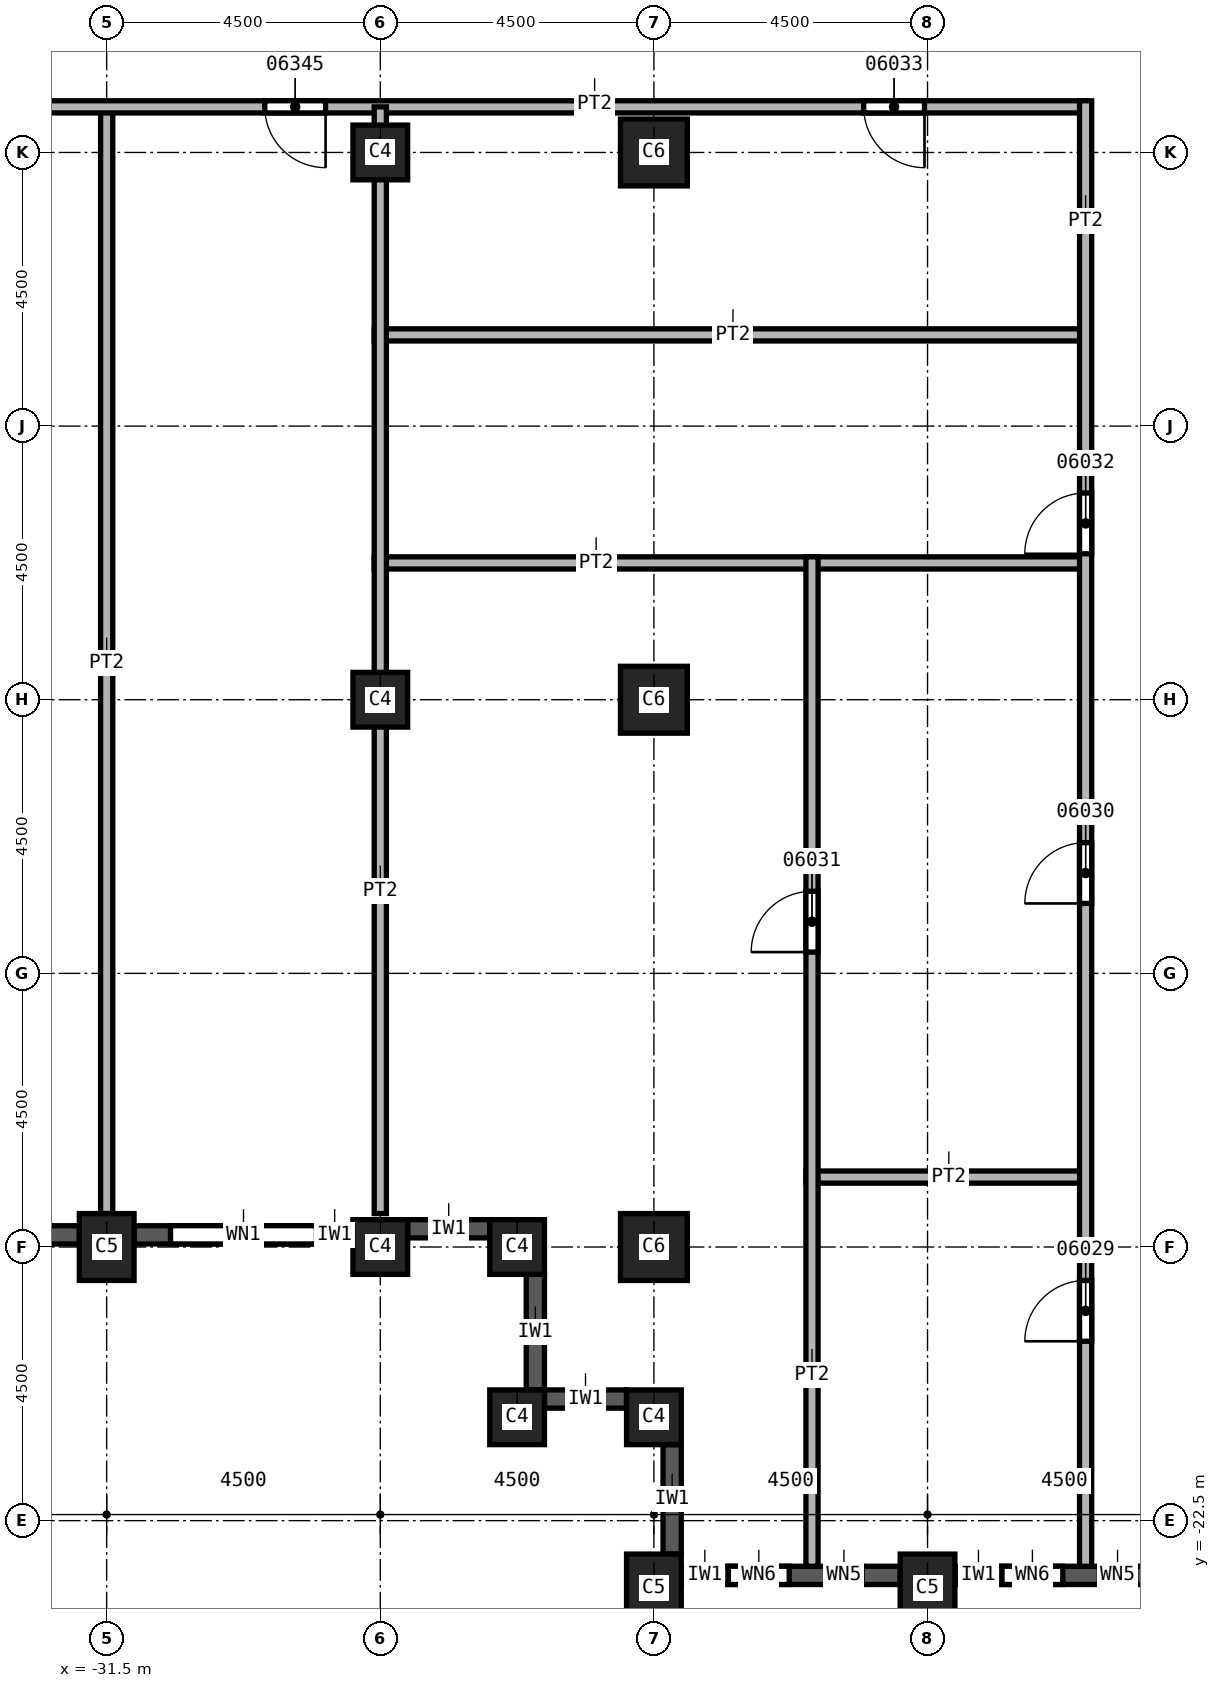
"""IFC4 building model, lengths in metres.
Left out: names, types, materials, properties, quantities, classifications, styles, units other than length and angle.
Written with IfcOpenShell. Run it as: python <this file> out.ifc"""

import sys

from ifc_helpers import new_model, si_unit, direction, frame, frame_2d, origin, origin_2d, place, context, subcontext, project, spatial, rectangle, extrude, element, fill, save


model = new_model("IFC4")
c1 = context("Model", 3, precision=1e-05, world=origin(), true_north=direction((0.0, 1.0)))
c2 = subcontext(c1, "Body", "Model", "MODEL_VIEW")
j1 = project(units=[si_unit("LENGTHUNIT", "METRE"), si_unit("PLANEANGLEUNIT", "RADIAN")], contexts=[c1])
p1 = place(None, origin())
s1 = spatial("IfcSite", under=j1, at=p1, CompositionType="ELEMENT")
p2 = place(p1, origin())
s2 = spatial("IfcBuilding", under=s1, at=p2, CompositionType="ELEMENT")
p3 = place(p2, frame((0.0, 0.0, 130.0)))
s3 = spatial("IfcBuildingStorey", under=s2, at=p3, CompositionType="ELEMENT", Elevation=130.0)
p4 = place(p3, frame((-31.5, -18.0, 0.0), z_axis=(0.0, 0.0, 1.0), x_axis=(1.0, 0.0, 0.0)))
e1 = element("IfcColumn", 1, at=p4, inside=s3, PredefinedType="COLUMN", context=c2, shape_type="SweptSolid", body=[
    extrude(rectangle(XDim=0.9, YDim=1.1, at=origin_2d()), origin(), (0.0, 0.0, 1.0), 3.7),
])
for number, where, z_axis, x_axis in (
    (2, (-22.5, 0.0, 0.0), (0.0, 0.0, 1.0), (1.0, 0.0, 0.0)),
    (3, (-22.5, -9.0, 0.0), (0.0, 0.0, 1.0), (1.0, 0.0, 0.0)),
    (4, (-22.5, -18.0, 0.0), (0.0, 0.0, 1.0), (1.0, 0.0, 0.0)),
):
    element("IfcColumn", number, at=place(p3, frame(where, z_axis=z_axis, x_axis=x_axis)), inside=s3, PredefinedType="COLUMN", context=c2, shape_type="SweptSolid", body=[
        extrude(rectangle(XDim=1.1, YDim=1.1, at=origin_2d()), origin(), (0.0, 0.0, 1.0), 3.7),
    ])
for number, where, z_axis, x_axis in (
    (5, (-18.0, -23.6, 0.0), (0.0, 0.0, 1.0), (1.0, 0.0, 0.0)),
    (6, (-22.5, -23.6, 0.0), (0.0, 0.0, 1.0), (1.0, 0.0, 0.0)),
):
    element("IfcColumn", number, at=place(p3, frame(where, z_axis=z_axis, x_axis=x_axis)), inside=s3, PredefinedType="COLUMN", context=c2, shape_type="SweptSolid", body=[
        extrude(rectangle(XDim=0.9, YDim=1.1, at=origin_2d()), origin(), (0.0, 0.0, 1.0), 3.7),
    ])
for number, where, z_axis, x_axis in (
    (7, (-27.0, 0.0, 0.0), (0.0, 0.0, 1.0), (1.0, 0.0, 0.0)),
    (8, (-27.0, -9.0, 0.0), (0.0, 0.0, 1.0), (1.0, 0.0, 0.0)),
    (9, (-27.0, -18.0, 0.0), (0.0, 0.0, 1.0), (1.0, 0.0, 0.0)),
    (10, (-22.5, -20.8, 0.0), (0.0, 0.0, 1.0), (1.0, 0.0, 0.0)),
    (11, (-24.75, -20.8, 0.0), (0.0, 0.0, 1.0), (1.0, 0.0, 0.0)),
    (12, (-24.75, -18.0, 0.0), (0.0, 0.0, 1.0), (1.0, 0.0, 0.0)),
):
    element("IfcColumn", number, at=place(p3, frame(where, z_axis=z_axis, x_axis=x_axis)), inside=s3, PredefinedType="COLUMN", context=c2, shape_type="SweptSolid", body=[
        extrude(rectangle(XDim=0.9, YDim=0.9, at=origin_2d()), origin(), (0.0, 0.0, 1.0), 3.7),
    ])
p5 = place(p3, frame((-35.55, -17.8, 0.0), z_axis=(0.0, 0.0, 1.0), x_axis=(1.0, 0.0, 0.0)))
e13 = element("IfcWall", 13, at=p5, inside=s3, PredefinedType="SOLIDWALL", context=c2, shape_type="SweptSolid", body=[
    extrude(rectangle(XDim=3.6, YDim=0.3, at=frame_2d((1.8, 0.0))), origin(), (0.0, 0.0, 1.0), 3.1),
])
p6 = place(p5, frame((0.6, 0.0, 0.8)))
e14 = element("IfcOpeningElement", 14, at=p6, cuts=e13, PredefinedType="OPENING", context=c2, shape_type="SweptSolid", body=[
    extrude(rectangle(XDim=2.4, YDim=1.95, at=frame_2d((1.2, 0.975))), frame((0.0, 0.15, 0.0), z_axis=(0.0, -1.0, 0.0), x_axis=(1.0, 0.0, 0.0)), (0.0, 0.0, 1.0), 0.3),
])
p7 = place(p3, frame((-31.05, -17.8, 0.0), z_axis=(0.0, 0.0, 1.0), x_axis=(1.0, 0.0, 0.0)))
e15 = element("IfcWall", 15, at=p7, inside=s3, PredefinedType="SOLIDWALL", context=c2, shape_type="SweptSolid", body=[
    extrude(rectangle(XDim=3.6, YDim=0.3, at=frame_2d((1.8, 0.0))), origin(), (0.0, 0.0, 1.0), 3.1),
])
p8 = place(p7, frame((0.6, 0.0, 0.8)))
e16 = element("IfcOpeningElement", 16, at=p8, cuts=e15, PredefinedType="OPENING", context=c2, shape_type="SweptSolid", body=[
    extrude(rectangle(XDim=2.4, YDim=1.95, at=frame_2d((1.2, 0.975))), frame((0.0, 0.15, 0.0), z_axis=(0.0, -1.0, 0.0), x_axis=(1.0, 0.0, 0.0)), (0.0, 0.0, 1.0), 0.3),
])
p9 = place(p3, frame((-26.55, -17.7, 0.0), z_axis=(0.0, 0.0, 1.0), x_axis=(1.0, 0.0, 0.0)))
e17 = element("IfcWall", 17, at=p9, inside=s3, PredefinedType="SOLIDWALL", context=c2, shape_type="SweptSolid", body=[
    extrude(rectangle(XDim=1.35, YDim=0.3, at=frame_2d((0.675, 0.0))), origin(), (0.0, 0.0, 1.0), 3.1),
])
p10 = place(p3, frame((-24.45, -18.45, 0.0), z_axis=(0.0, 0.0, 1.0), x_axis=(0.0, -1.0, 0.0)))
e18 = element("IfcWall", 18, at=p10, inside=s3, PredefinedType="SOLIDWALL", context=c2, shape_type="SweptSolid", body=[
    extrude(rectangle(XDim=1.9, YDim=0.3, at=frame_2d((0.95, 0.0))), origin(), (0.0, 0.0, 1.0), 3.1),
])
p11 = place(p3, frame((-24.3, -20.5, 0.0), z_axis=(0.0, 0.0, 1.0), x_axis=(1.0, 0.0, 0.0)))
e19 = element("IfcWall", 19, at=p11, inside=s3, PredefinedType="SOLIDWALL", context=c2, shape_type="SweptSolid", body=[
    extrude(rectangle(XDim=1.35, YDim=0.3, at=frame_2d((0.675, 0.0))), origin(), (0.0, 0.0, 1.0), 3.1),
])
p12 = place(p3, frame((-22.2, -21.25, 0.0), z_axis=(0.0, 0.0, 1.0), x_axis=(0.0, -1.0, 0.0)))
e20 = element("IfcWall", 20, at=p12, inside=s3, PredefinedType="SOLIDWALL", context=c2, shape_type="SweptSolid", body=[
    extrude(rectangle(XDim=1.8, YDim=0.3, at=frame_2d((0.9, 0.0))), origin(), (0.0, 0.0, 1.0), 3.1),
])
p13 = place(p3, frame((-22.05, -23.4, 0.0), z_axis=(0.0, 0.0, 1.0), x_axis=(1.0, 0.0, 0.0)))
e21 = element("IfcWall", 21, at=p13, inside=s3, PredefinedType="SOLIDWALL", context=c2, shape_type="SweptSolid", body=[
    extrude(rectangle(XDim=3.6, YDim=0.3, at=frame_2d((1.8, 0.0))), origin(), (0.0, 0.0, 1.0), 3.1),
])
p14 = place(p13, frame((0.775, 0.0, 0.8)))
e22 = element("IfcOpeningElement", 22, at=p14, cuts=e21, PredefinedType="OPENING", context=c2, shape_type="SweptSolid", body=[
    extrude(rectangle(XDim=1.0, YDim=1.95, at=frame_2d((0.5, 0.975))), frame((0.0, 0.15, 0.0), z_axis=(0.0, -1.0, 0.0), x_axis=(1.0, 0.0, 0.0)), (0.0, 0.0, 1.0), 0.3),
])
p15 = place(p13, frame((2.375, 0.0, 0.8)))
e23 = element("IfcOpeningElement", 23, at=p15, cuts=e21, PredefinedType="OPENING", context=c2, shape_type="SweptSolid", body=[
    extrude(rectangle(XDim=0.6, YDim=1.95, at=frame_2d((0.3, 0.975))), frame((0.0, 0.15, 0.0), z_axis=(0.0, -1.0, 0.0), x_axis=(1.0, 0.0, 0.0)), (0.0, 0.0, 1.0), 0.3),
])
p16 = place(p3, frame((-17.55, -23.4, 0.0), z_axis=(0.0, 0.0, 1.0), x_axis=(1.0, 0.0, 0.0)))
e24 = element("IfcWall", 24, at=p16, inside=s3, PredefinedType="SOLIDWALL", context=c2, shape_type="SweptSolid", body=[
    extrude(rectangle(XDim=3.6, YDim=0.3, at=frame_2d((1.8, 0.0))), origin(), (0.0, 0.0, 1.0), 3.1),
])
p17 = place(p16, frame((0.775, 0.0, 0.8)))
e25 = element("IfcOpeningElement", 25, at=p17, cuts=e24, PredefinedType="OPENING", context=c2, shape_type="SweptSolid", body=[
    extrude(rectangle(XDim=1.0, YDim=1.95, at=frame_2d((0.5, 0.975))), frame((0.0, 0.15, 0.0), z_axis=(0.0, -1.0, 0.0), x_axis=(1.0, 0.0, 0.0)), (0.0, 0.0, 1.0), 0.3),
])
p18 = place(p16, frame((2.375, 0.0, 0.8)))
e26 = element("IfcOpeningElement", 26, at=p18, cuts=e24, PredefinedType="OPENING", context=c2, shape_type="SweptSolid", body=[
    extrude(rectangle(XDim=0.6, YDim=1.95, at=frame_2d((0.3, 0.975))), frame((0.0, 0.15, 0.0), z_axis=(0.0, -1.0, 0.0), x_axis=(1.0, 0.0, 0.0)), (0.0, 0.0, 1.0), 0.3),
])
p19 = place(p3, frame((-31.5, 0.75, 0.0), z_axis=(0.0, 0.0, 1.0), x_axis=(0.0, -1.0, 0.0)))
e27 = element("IfcWall", 27, at=p19, inside=s3, PredefinedType="PARTITIONING", context=c2, shape_type="SweptSolid", body=[
    extrude(rectangle(XDim=18.2, YDim=0.2, at=frame_2d((9.1, 0.0))), origin(), (0.0, 0.0, 1.0), 3.7),
])
p20 = place(p3, frame((-15.4, 0.75, 0.0), z_axis=(0.0, 0.0, 1.0), x_axis=(-1.0, 0.0, 0.0)))
e28 = element("IfcWall", 28, at=p20, inside=s3, PredefinedType="PARTITIONING", context=c2, shape_type="SweptSolid", body=[
    extrude(rectangle(XDim=18.45, YDim=0.2, at=frame_2d((9.225, 0.0))), origin(), (0.0, 0.0, 1.0), 3.7),
])
p21 = place(p20, frame((2.65, 0.0, 0.0)))
e29 = element("IfcOpeningElement", 29, at=p21, cuts=e28, PredefinedType="OPENING", context=c2, shape_type="SweptSolid", body=[
    extrude(rectangle(XDim=1.0, YDim=2.1, at=frame_2d((0.5, 1.05))), frame((0.0, 0.1, 0.0), z_axis=(0.0, -1.0, 0.0), x_axis=(1.0, 0.0, 0.0)), (0.0, 0.0, 1.0), 0.2),
])
p22 = place(p20, frame((12.5, 0.0, 0.0)))
e30 = element("IfcOpeningElement", 30, at=p22, cuts=e28, PredefinedType="OPENING", context=c2, shape_type="SweptSolid", body=[
    extrude(rectangle(XDim=1.0, YDim=2.1, at=frame_2d((0.5, 1.05))), frame((0.0, 0.1, 0.0), z_axis=(0.0, -1.0, 0.0), x_axis=(1.0, 0.0, 0.0)), (0.0, 0.0, 1.0), 0.2),
])
for number, where, z_axis, x_axis in (
    (31, (-27.1, -6.75, 0.0), (0.0, 0.0, 1.0), (1.0, 0.0, 0.0)),
    (32, (-27.1, -3.0, 0.0), (0.0, 0.0, 1.0), (1.0, 0.0, 0.0)),
):
    element("IfcWall", number, at=place(p3, frame(where, z_axis=z_axis, x_axis=x_axis)), inside=s3, PredefinedType="PARTITIONING", context=c2, shape_type="SweptSolid", body=[
        extrude(rectangle(XDim=11.7, YDim=0.2, at=frame_2d((5.85, 0.0))), origin(), (0.0, 0.0, 1.0), 3.7),
    ])
p23 = place(p3, frame((-27.0, -17.45, 0.0), z_axis=(0.0, 0.0, 1.0), x_axis=(0.0, 1.0, 0.0)))
e33 = element("IfcWall", 33, at=p23, inside=s3, PredefinedType="PARTITIONING", context=c2, shape_type="SweptSolid", body=[
    extrude(rectangle(XDim=18.2, YDim=0.2, at=frame_2d((9.1, 0.0))), origin(), (0.0, 0.0, 1.0), 3.7),
])
p24 = place(p3, frame((-20.0, -16.85, 0.0), z_axis=(0.0, 0.0, 1.0), x_axis=(1.0, 0.0, 0.0)))
e34 = element("IfcWall", 34, at=p24, inside=s3, PredefinedType="PARTITIONING", context=c2, shape_type="SweptSolid", body=[
    extrude(rectangle(XDim=4.6, YDim=0.2, at=frame_2d((2.3, 0.0))), origin(), (0.0, 0.0, 1.0), 3.7),
])
p25 = place(p3, frame((-19.9, -23.25, 0.0), z_axis=(0.0, 0.0, 1.0), x_axis=(0.0, 1.0, 0.0)))
e35 = element("IfcWall", 35, at=p25, inside=s3, PredefinedType="PARTITIONING", context=c2, shape_type="SweptSolid", body=[
    extrude(rectangle(XDim=16.6, YDim=0.2, at=frame_2d((8.3, 0.0))), origin(), (0.0, 0.0, 1.0), 3.7),
])
p26 = place(p25, frame((10.1, 0.0, 0.0)))
e36 = element("IfcOpeningElement", 36, at=p26, cuts=e35, PredefinedType="OPENING", context=c2, shape_type="SweptSolid", body=[
    extrude(rectangle(XDim=1.0, YDim=2.1, at=frame_2d((0.5, 1.05))), frame((0.0, 0.1, 0.0), z_axis=(0.0, -1.0, 0.0), x_axis=(1.0, 0.0, 0.0)), (0.0, 0.0, 1.0), 0.2),
])
p27 = place(p3, frame((-15.4, -23.25, 0.0), z_axis=(0.0, 0.0, 1.0), x_axis=(0.0, 1.0, 0.0)))
e37 = element("IfcWall", 37, at=p27, inside=s3, PredefinedType="PARTITIONING", context=c2, shape_type="SweptSolid", body=[
    extrude(rectangle(XDim=24.1, YDim=0.2, at=frame_2d((12.05, 0.0))), origin(), (0.0, 0.0, 1.0), 3.7),
])
p28 = place(p27, frame((3.7, 0.0, 0.0)))
e38 = element("IfcOpeningElement", 38, at=p28, cuts=e37, PredefinedType="OPENING", context=c2, shape_type="SweptSolid", body=[
    extrude(rectangle(XDim=1.0, YDim=2.1, at=frame_2d((0.5, 1.05))), frame((0.0, 0.1, 0.0), z_axis=(0.0, -1.0, 0.0), x_axis=(1.0, 0.0, 0.0)), (0.0, 0.0, 1.0), 0.2),
])
p29 = place(p27, frame((10.9, 0.0, 0.0)))
e39 = element("IfcOpeningElement", 39, at=p29, cuts=e37, PredefinedType="OPENING", context=c2, shape_type="SweptSolid", body=[
    extrude(rectangle(XDim=1.0, YDim=2.1, at=frame_2d((0.5, 1.05))), frame((0.0, 0.1, 0.0), z_axis=(0.0, -1.0, 0.0), x_axis=(1.0, 0.0, 0.0)), (0.0, 0.0, 1.0), 0.2),
])
p30 = place(p27, frame((16.65, 0.0, 0.0)))
e40 = element("IfcOpeningElement", 40, at=p30, cuts=e37, PredefinedType="OPENING", context=c2, shape_type="SweptSolid", body=[
    extrude(rectangle(XDim=1.0, YDim=2.1, at=frame_2d((0.5, 1.05))), frame((0.0, 0.1, 0.0), z_axis=(0.0, -1.0, 0.0), x_axis=(1.0, 0.0, 0.0)), (0.0, 0.0, 1.0), 0.2),
])
p31 = place(p8, origin())
e41 = element("IfcWindow", 41, at=p31, inside=s3, PartitioningType="SINGLE_PANEL", PredefinedType="WINDOW", context=c2, shape_type="SweptSolid", body=[
    extrude(rectangle(XDim=2.4, YDim=1.95, at=frame_2d((1.2, 0.975))), frame((0.0, 0.03, 0.0), z_axis=(0.0, -1.0, 0.0), x_axis=(1.0, 0.0, 0.0)), (0.0, 0.0, 1.0), 0.06),
])
fill(e16, e41)
p32 = place(p28, origin())
e42 = element("IfcDoor", 42, at=p32, inside=s3, OperationType="SINGLE_SWING_RIGHT", PredefinedType="DOOR", context=c2, shape_type="SweptSolid", body=[
    extrude(rectangle(XDim=1.0, YDim=2.1, at=frame_2d((0.5, 1.05))), frame((0.0, 0.025, 0.0), z_axis=(0.0, -1.0, 0.0), x_axis=(1.0, 0.0, 0.0)), (0.0, 0.0, 1.0), 0.05),
])
fill(e38, e42)
p33 = place(p29, origin())
e43 = element("IfcDoor", 43, at=p33, inside=s3, OperationType="SINGLE_SWING_LEFT", PredefinedType="DOOR", context=c2, shape_type="SweptSolid", body=[
    extrude(rectangle(XDim=1.0, YDim=2.1, at=frame_2d((0.5, 1.05))), frame((0.0, 0.025, 0.0), z_axis=(0.0, -1.0, 0.0), x_axis=(1.0, 0.0, 0.0)), (0.0, 0.0, 1.0), 0.05),
])
fill(e39, e43)
p34 = place(p26, origin())
e44 = element("IfcDoor", 44, at=p34, inside=s3, OperationType="SINGLE_SWING_RIGHT", PredefinedType="DOOR", context=c2, shape_type="SweptSolid", body=[
    extrude(rectangle(XDim=1.0, YDim=2.1, at=frame_2d((0.5, 1.05))), frame((0.0, 0.025, 0.0), z_axis=(0.0, -1.0, 0.0), x_axis=(1.0, 0.0, 0.0)), (0.0, 0.0, 1.0), 0.05),
])
fill(e36, e44)
p35 = place(p30, origin())
e45 = element("IfcDoor", 45, at=p35, inside=s3, OperationType="SINGLE_SWING_LEFT", PredefinedType="DOOR", context=c2, shape_type="SweptSolid", body=[
    extrude(rectangle(XDim=1.0, YDim=2.1, at=frame_2d((0.5, 1.05))), frame((0.0, 0.025, 0.0), z_axis=(0.0, -1.0, 0.0), x_axis=(1.0, 0.0, 0.0)), (0.0, 0.0, 1.0), 0.05),
])
fill(e40, e45)
p36 = place(p21, origin())
e46 = element("IfcDoor", 46, at=p36, inside=s3, OperationType="SINGLE_SWING_RIGHT", PredefinedType="DOOR", context=c2, shape_type="SweptSolid", body=[
    extrude(rectangle(XDim=1.0, YDim=2.1, at=frame_2d((0.5, 1.05))), frame((0.0, 0.025, 0.0), z_axis=(0.0, -1.0, 0.0), x_axis=(1.0, 0.0, 0.0)), (0.0, 0.0, 1.0), 0.05),
])
fill(e29, e46)
p37 = place(p22, origin())
e47 = element("IfcDoor", 47, at=p37, inside=s3, OperationType="SINGLE_SWING_RIGHT", PredefinedType="DOOR", context=c2, shape_type="SweptSolid", body=[
    extrude(rectangle(XDim=1.0, YDim=2.1, at=frame_2d((0.5, 1.05))), frame((0.0, 0.025, 0.0), z_axis=(0.0, -1.0, 0.0), x_axis=(1.0, 0.0, 0.0)), (0.0, 0.0, 1.0), 0.05),
])
fill(e30, e47)
p38 = place(p14, origin())
e48 = element("IfcWindow", 48, at=p38, inside=s3, PartitioningType="SINGLE_PANEL", PredefinedType="WINDOW", context=c2, shape_type="SweptSolid", body=[
    extrude(rectangle(XDim=1.0, YDim=1.95, at=frame_2d((0.5, 0.975))), frame((0.0, 0.03, 0.0), z_axis=(0.0, -1.0, 0.0), x_axis=(1.0, 0.0, 0.0)), (0.0, 0.0, 1.0), 0.06),
])
fill(e22, e48)
p39 = place(p15, origin())
e49 = element("IfcWindow", 49, at=p39, inside=s3, PartitioningType="SINGLE_PANEL", PredefinedType="WINDOW", context=c2, shape_type="SweptSolid", body=[
    extrude(rectangle(XDim=0.6, YDim=1.95, at=frame_2d((0.3, 0.975))), frame((0.0, 0.03, 0.0), z_axis=(0.0, -1.0, 0.0), x_axis=(1.0, 0.0, 0.0)), (0.0, 0.0, 1.0), 0.06),
])
fill(e23, e49)
p40 = place(p17, origin())
e50 = element("IfcWindow", 50, at=p40, inside=s3, PartitioningType="SINGLE_PANEL", PredefinedType="WINDOW", context=c2, shape_type="SweptSolid", body=[
    extrude(rectangle(XDim=1.0, YDim=1.95, at=frame_2d((0.5, 0.975))), frame((0.0, 0.03, 0.0), z_axis=(0.0, -1.0, 0.0), x_axis=(1.0, 0.0, 0.0)), (0.0, 0.0, 1.0), 0.06),
])
fill(e25, e50)
p41 = place(p18, origin())
e51 = element("IfcWindow", 51, at=p41, inside=s3, PartitioningType="SINGLE_PANEL", PredefinedType="WINDOW", context=c2, shape_type="SweptSolid", body=[
    extrude(rectangle(XDim=0.6, YDim=1.95, at=frame_2d((0.3, 0.975))), frame((0.0, 0.03, 0.0), z_axis=(0.0, -1.0, 0.0), x_axis=(1.0, 0.0, 0.0)), (0.0, 0.0, 1.0), 0.06),
])
fill(e26, e51)
save(model, sys.argv[1])
